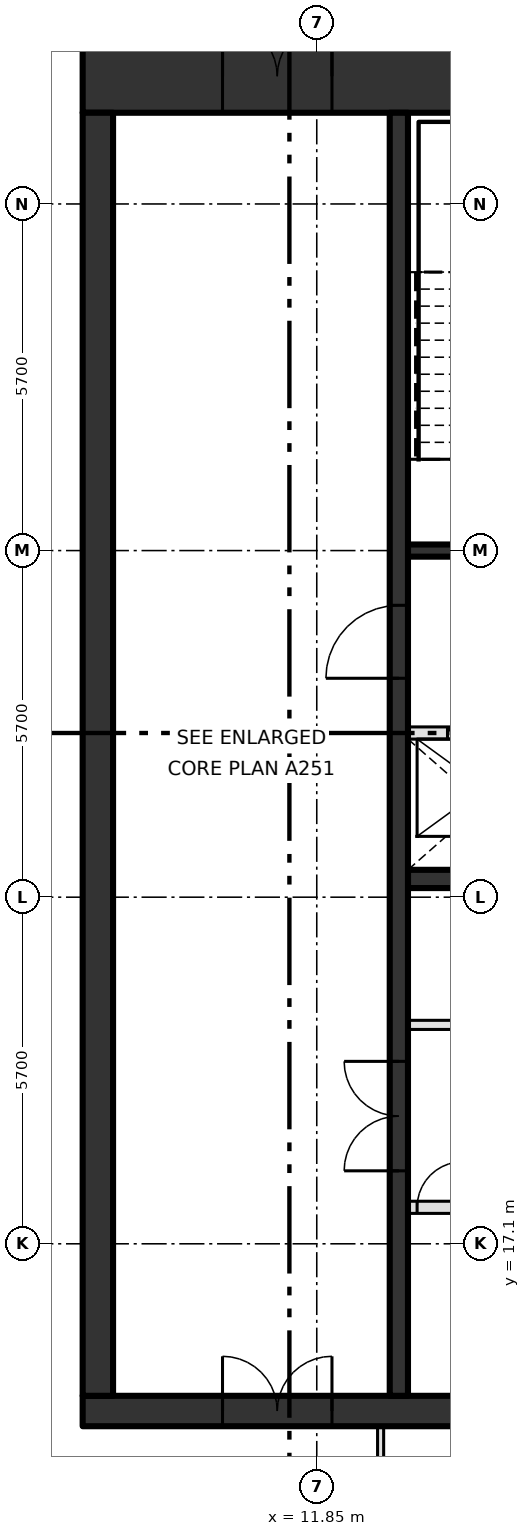
"""IFC4 building model, lengths in metres.
Left out: names, types, materials, properties, quantities, classifications, styles, units other than length and angle.
Written with IfcOpenShell. Run it as: python <this file> out.ifc"""

import sys

from ifc_helpers import new_model, si_unit, direction, frame, frame_2d, origin, place, context, subcontext, project, spatial, rectangle, extrude, element, fill, save


model = new_model("IFC4")
c1 = context("Model", 3, precision=1e-05, world=origin(), true_north=direction((0.0, 1.0)))
c2 = subcontext(c1, "Body", "Model", "MODEL_VIEW")
j1 = project(units=[si_unit("LENGTHUNIT", "METRE"), si_unit("PLANEANGLEUNIT", "RADIAN")], contexts=[c1])
p1 = place(None, origin())
s1 = spatial("IfcSite", under=j1, at=p1, CompositionType="ELEMENT")
p2 = place(p1, origin())
s2 = spatial("IfcBuilding", under=s1, at=p2, CompositionType="ELEMENT")
p3 = place(p2, frame((0.0, 0.0, 387.6)))
s3 = spatial("IfcBuildingStorey", under=s2, at=p3, CompositionType="ELEMENT", Elevation=387.6)
p4 = place(p3, frame((8.0, 14.35, -0.3), z_axis=(0.0, 0.0, 1.0), x_axis=(1.0, 0.0, 0.0)))
e1 = element("IfcWall", 1, at=p4, inside=s3, PredefinedType="SHEAR", context=c2, shape_type="SweptSolid", body=[
    extrude(rectangle(XDim=22.8, YDim=0.5, at=frame_2d((11.4, 0.0))), origin(), (0.0, 0.0, 1.0), 4.2),
])
p5 = place(p4, frame((2.3, 0.0, 0.3)))
e2 = element("IfcOpeningElement", 2, at=p5, cuts=e1, PredefinedType="OPENING", context=c2, shape_type="SweptSolid", body=[
    extrude(rectangle(XDim=1.8, YDim=2.1, at=frame_2d((0.9, 1.05))), frame((0.0, 0.26, 0.0), z_axis=(0.0, -1.0, 0.0), x_axis=(1.0, 0.0, 0.0)), (0.0, 0.0, 1.0), 0.52),
])
p6 = place(p3, frame((8.0, 36.3, -0.3), z_axis=(0.0, 0.0, 1.0), x_axis=(1.0, 0.0, 0.0)))
e3 = element("IfcWall", 3, at=p6, inside=s3, PredefinedType="SHEAR", context=c2, shape_type="SweptSolid", body=[
    extrude(rectangle(XDim=22.8, YDim=1.2, at=frame_2d((11.4, 0.0))), origin(), (0.0, 0.0, 1.0), 4.2),
])
p7 = place(p6, frame((2.3, 0.0, 0.3)))
e4 = element("IfcOpeningElement", 4, at=p7, cuts=e3, PredefinedType="OPENING", context=c2, shape_type="SweptSolid", body=[
    extrude(rectangle(XDim=1.8, YDim=2.1, at=frame_2d((0.9, 1.05))), frame((0.0, 0.61, 0.0), z_axis=(0.0, -1.0, 0.0), x_axis=(1.0, 0.0, 0.0)), (0.0, 0.0, 1.0), 1.22),
])
p8 = place(p3, frame((8.25, 14.6, -0.3), z_axis=(0.0, 0.0, 1.0), x_axis=(0.0, 1.0, 0.0)))
e5 = element("IfcWall", 5, at=p8, inside=s3, PredefinedType="SHEAR", context=c2, shape_type="SweptSolid", body=[
    extrude(rectangle(XDim=21.1, YDim=0.5, at=frame_2d((10.55, 0.0))), origin(), (0.0, 0.0, 1.0), 4.2),
])
p9 = place(p3, frame((13.35, 17.7, 0.0), z_axis=(0.0, 0.0, 1.0), x_axis=(1.0, 0.0, 0.0)))
e6 = element("IfcWall", 6, at=p9, inside=s3, PredefinedType="SOLIDWALL", context=c2, shape_type="SweptSolid", body=[
    extrude(rectangle(XDim=13.425, YDim=0.2, at=frame_2d((6.712, 0.0))), origin(), (0.0, 0.0, 1.0), 3.9),
])
p10 = place(p9, frame((2.0, 0.0, 0.0)))
e7 = element("IfcOpeningElement", 7, at=p10, cuts=e6, PredefinedType="OPENING", context=c2, shape_type="SweptSolid", body=[
    extrude(rectangle(XDim=1.1, YDim=2.1, at=frame_2d((0.55, 1.05))), frame((0.0, 0.11, 0.0), z_axis=(0.0, -1.0, 0.0), x_axis=(1.0, 0.0, 0.0)), (0.0, 0.0, 1.0), 0.22),
])
p11 = place(p9, frame((4.7, 0.0, 0.0)))
e8 = element("IfcOpeningElement", 8, at=p11, cuts=e6, PredefinedType="OPENING", context=c2, shape_type="SweptSolid", body=[
    extrude(rectangle(XDim=1.1, YDim=2.1, at=frame_2d((0.55, 1.05))), frame((0.0, 0.11, 0.0), z_axis=(0.0, -1.0, 0.0), x_axis=(1.0, 0.0, 0.0)), (0.0, 0.0, 1.0), 0.22),
])
p12 = place(p9, frame((7.4, 0.0, 0.0)))
e9 = element("IfcOpeningElement", 9, at=p12, cuts=e6, PredefinedType="OPENING", context=c2, shape_type="SweptSolid", body=[
    extrude(rectangle(XDim=1.1, YDim=2.1, at=frame_2d((0.55, 1.05))), frame((0.0, 0.11, 0.0), z_axis=(0.0, -1.0, 0.0), x_axis=(1.0, 0.0, 0.0)), (0.0, 0.0, 1.0), 0.22),
])
p13 = place(p9, frame((10.1, 0.0, 0.0)))
e10 = element("IfcOpeningElement", 10, at=p13, cuts=e6, PredefinedType="OPENING", context=c2, shape_type="SweptSolid", body=[
    extrude(rectangle(XDim=1.1, YDim=2.1, at=frame_2d((0.55, 1.05))), frame((0.0, 0.11, 0.0), z_axis=(0.0, -1.0, 0.0), x_axis=(1.0, 0.0, 0.0)), (0.0, 0.0, 1.0), 0.22),
])
p14 = place(p9, frame((0.15, 0.0, 0.0)))
e11 = element("IfcOpeningElement", 11, at=p14, cuts=e6, PredefinedType="OPENING", context=c2, shape_type="SweptSolid", body=[
    extrude(rectangle(XDim=0.75, YDim=2.1, at=frame_2d((0.375, 1.05))), frame((0.0, 0.11, 0.0), z_axis=(0.0, -1.0, 0.0), x_axis=(1.0, 0.0, 0.0)), (0.0, 0.0, 1.0), 0.22),
])
p15 = place(p9, frame((12.3, 0.0, 0.0)))
e12 = element("IfcOpeningElement", 12, at=p15, cuts=e6, PredefinedType="OPENING", context=c2, shape_type="SweptSolid", body=[
    extrude(rectangle(XDim=0.75, YDim=2.1, at=frame_2d((0.375, 1.05))), frame((0.0, 0.11, 0.0), z_axis=(0.0, -1.0, 0.0), x_axis=(1.0, 0.0, 0.0)), (0.0, 0.0, 1.0), 0.22),
])
p16 = place(p3, frame((13.35, 20.7, 0.0), z_axis=(0.0, 0.0, 1.0), x_axis=(1.0, 0.0, 0.0)))
e13 = element("IfcWall", 13, at=p16, inside=s3, PredefinedType="PARTITIONING", context=c2, shape_type="SweptSolid", body=[
    extrude(rectangle(XDim=13.425, YDim=0.15, at=frame_2d((6.712, 0.0))), origin(), (0.0, 0.0, 1.0), 3.9),
])
p17 = place(p16, frame((2.1, 0.0, 0.0)))
e14 = element("IfcOpeningElement", 14, at=p17, cuts=e13, PredefinedType="OPENING", context=c2, shape_type="SweptSolid", body=[
    extrude(rectangle(XDim=0.9, YDim=2.1, at=frame_2d((0.45, 1.05))), frame((0.0, 0.085, 0.0), z_axis=(0.0, -1.0, 0.0), x_axis=(1.0, 0.0, 0.0)), (0.0, 0.0, 1.0), 0.17),
])
p18 = place(p16, frame((8.85, 0.0, 0.0)))
e15 = element("IfcOpeningElement", 15, at=p18, cuts=e13, PredefinedType="OPENING", context=c2, shape_type="SweptSolid", body=[
    extrude(rectangle(XDim=0.9, YDim=2.1, at=frame_2d((0.45, 1.05))), frame((0.0, 0.085, 0.0), z_axis=(0.0, -1.0, 0.0), x_axis=(1.0, 0.0, 0.0)), (0.0, 0.0, 1.0), 0.17),
])
p19 = place(p3, frame((13.35, 23.1, 0.0), z_axis=(0.0, 0.0, 1.0), x_axis=(1.0, 0.0, 0.0)))
e16 = element("IfcWall", 16, at=p19, inside=s3, PredefinedType="SHEAR", context=c2, shape_type="SweptSolid", body=[
    extrude(rectangle(XDim=16.95, YDim=0.3, at=frame_2d((8.475, 0.0))), origin(), (0.0, 0.0, 1.0), 3.9),
])
p20 = place(p3, frame((13.35, 25.5, 0.0), z_axis=(0.0, 0.0, 1.0), x_axis=(1.0, 0.0, 0.0)))
e17 = element("IfcWall", 17, at=p20, inside=s3, PredefinedType="SOLIDWALL", context=c2, shape_type="SweptSolid", body=[
    extrude(rectangle(XDim=16.95, YDim=0.2, at=frame_2d((8.475, 0.0))), origin(), (0.0, 0.0, 1.0), 3.9),
])
p21 = place(p20, frame((0.65, 0.0, 0.0)))
e18 = element("IfcOpeningElement", 18, at=p21, cuts=e17, PredefinedType="OPENING", context=c2, shape_type="SweptSolid", body=[
    extrude(rectangle(XDim=1.1, YDim=2.1, at=frame_2d((0.55, 1.05))), frame((0.0, 0.11, 0.0), z_axis=(0.0, -1.0, 0.0), x_axis=(1.0, 0.0, 0.0)), (0.0, 0.0, 1.0), 0.22),
])
p22 = place(p20, frame((3.35, 0.0, 0.0)))
e19 = element("IfcOpeningElement", 19, at=p22, cuts=e17, PredefinedType="OPENING", context=c2, shape_type="SweptSolid", body=[
    extrude(rectangle(XDim=1.1, YDim=2.1, at=frame_2d((0.55, 1.05))), frame((0.0, 0.11, 0.0), z_axis=(0.0, -1.0, 0.0), x_axis=(1.0, 0.0, 0.0)), (0.0, 0.0, 1.0), 0.22),
])
p23 = place(p20, frame((6.05, 0.0, 0.0)))
e20 = element("IfcOpeningElement", 20, at=p23, cuts=e17, PredefinedType="OPENING", context=c2, shape_type="SweptSolid", body=[
    extrude(rectangle(XDim=1.1, YDim=2.1, at=frame_2d((0.55, 1.05))), frame((0.0, 0.11, 0.0), z_axis=(0.0, -1.0, 0.0), x_axis=(1.0, 0.0, 0.0)), (0.0, 0.0, 1.0), 0.22),
])
p24 = place(p20, frame((8.75, 0.0, 0.0)))
e21 = element("IfcOpeningElement", 21, at=p24, cuts=e17, PredefinedType="OPENING", context=c2, shape_type="SweptSolid", body=[
    extrude(rectangle(XDim=1.1, YDim=2.1, at=frame_2d((0.55, 1.05))), frame((0.0, 0.11, 0.0), z_axis=(0.0, -1.0, 0.0), x_axis=(1.0, 0.0, 0.0)), (0.0, 0.0, 1.0), 0.22),
])
p25 = place(p20, frame((13.0, 0.0, 0.0)))
e22 = element("IfcOpeningElement", 22, at=p25, cuts=e17, PredefinedType="OPENING", context=c2, shape_type="SweptSolid", body=[
    extrude(rectangle(XDim=0.9, YDim=2.1, at=frame_2d((0.45, 1.05))), frame((0.0, 0.11, 0.0), z_axis=(0.0, -1.0, 0.0), x_axis=(1.0, 0.0, 0.0)), (0.0, 0.0, 1.0), 0.22),
])
p26 = place(p3, frame((13.35, 28.5, 0.0), z_axis=(0.0, 0.0, 1.0), x_axis=(1.0, 0.0, 0.0)))
e23 = element("IfcWall", 23, at=p26, inside=s3, PredefinedType="SOLIDWALL", context=c2, shape_type="SweptSolid", body=[
    extrude(rectangle(XDim=6.75, YDim=0.2, at=frame_2d((3.375, 0.0))), origin(), (0.0, 0.0, 1.0), 3.9),
])
p27 = place(p26, frame((0.95, 0.0, 0.0)))
e24 = element("IfcOpeningElement", 24, at=p27, cuts=e23, PredefinedType="OPENING", context=c2, shape_type="SweptSolid", body=[
    extrude(rectangle(XDim=1.2, YDim=2.1, at=frame_2d((0.6, 1.05))), frame((0.0, 0.11, 0.0), z_axis=(0.0, -1.0, 0.0), x_axis=(1.0, 0.0, 0.0)), (0.0, 0.0, 1.0), 0.22),
])
p28 = place(p26, frame((3.75, 0.0, 0.0)))
e25 = element("IfcOpeningElement", 25, at=p28, cuts=e23, PredefinedType="OPENING", context=c2, shape_type="SweptSolid", body=[
    extrude(rectangle(XDim=1.1, YDim=2.1, at=frame_2d((0.55, 1.05))), frame((0.0, 0.11, 0.0), z_axis=(0.0, -1.0, 0.0), x_axis=(1.0, 0.0, 0.0)), (0.0, 0.0, 1.0), 0.22),
])
p29 = place(p3, frame((13.2, 14.6, 0.0), z_axis=(0.0, 0.0, 1.0), x_axis=(0.0, 1.0, 0.0)))
e26 = element("IfcWall", 26, at=p29, inside=s3, PredefinedType="SHEAR", context=c2, shape_type="SweptSolid", body=[
    extrude(rectangle(XDim=21.1, YDim=0.3, at=frame_2d((10.55, 0.0))), origin(), (0.0, 0.0, 1.0), 3.9),
])
p30 = place(p29, frame((3.7, 0.0, 0.0)))
e27 = element("IfcOpeningElement", 27, at=p30, cuts=e26, PredefinedType="OPENING", context=c2, shape_type="SweptSolid", body=[
    extrude(rectangle(XDim=1.8, YDim=2.1, at=frame_2d((0.9, 1.05))), frame((0.0, 0.16, 0.0), z_axis=(0.0, -1.0, 0.0), x_axis=(1.0, 0.0, 0.0)), (0.0, 0.0, 1.0), 0.32),
])
p31 = place(p29, frame((11.8, 0.0, 0.0)))
e28 = element("IfcOpeningElement", 28, at=p31, cuts=e26, PredefinedType="OPENING", context=c2, shape_type="SweptSolid", body=[
    extrude(rectangle(XDim=1.2, YDim=2.1, at=frame_2d((0.6, 1.05))), frame((0.0, 0.16, 0.0), z_axis=(0.0, -1.0, 0.0), x_axis=(1.0, 0.0, 0.0)), (0.0, 0.0, 1.0), 0.32),
])
p32 = place(p3, frame((12.9, 10.078, 0.0), z_axis=(0.0, 0.0, 1.0), x_axis=(0.0, 1.0, 0.0)))
e29 = element("IfcWall", 29, at=p32, inside=s3, PredefinedType="PARTITIONING", context=c2, shape_type="SweptSolid", body=[
    extrude(rectangle(XDim=4.022, YDim=0.1, at=frame_2d((2.011, 0.0))), origin(), (0.0, 0.0, 1.0), 3.9),
])
p33 = place(p32, frame((1.58, 0.0, 0.0)))
e30 = element("IfcOpeningElement", 30, at=p33, cuts=e29, PredefinedType="OPENING", context=c2, shape_type="SweptSolid", body=[
    extrude(rectangle(XDim=1.0, YDim=2.1, at=frame_2d((0.5, 1.05))), frame((0.0, 0.06, 0.0), z_axis=(0.0, -1.0, 0.0), x_axis=(1.0, 0.0, 0.0)), (0.0, 0.0, 1.0), 0.12),
])
p34 = place(p21, origin())
e31 = element("IfcDoor", 31, at=p34, inside=s3, OperationType="SLIDING_TO_LEFT", PredefinedType="DOOR", context=c2, shape_type="SweptSolid", body=[
    extrude(rectangle(XDim=1.1, YDim=2.1, at=frame_2d((0.55, 1.05))), frame((0.0, 0.025, 0.0), z_axis=(0.0, -1.0, 0.0), x_axis=(1.0, 0.0, 0.0)), (0.0, 0.0, 1.0), 0.05),
])
fill(e18, e31)
p35 = place(p14, origin())
e32 = element("IfcDoor", 32, at=p35, inside=s3, OperationType="SINGLE_SWING_RIGHT", PredefinedType="DOOR", context=c2, shape_type="SweptSolid", body=[
    extrude(rectangle(XDim=0.75, YDim=2.1, at=frame_2d((0.375, 1.05))), frame((0.0, 0.025, 0.0), z_axis=(0.0, -1.0, 0.0), x_axis=(1.0, 0.0, 0.0)), (0.0, 0.0, 1.0), 0.05),
])
fill(e11, e32)
p36 = place(p30, origin())
e33 = element("IfcDoor", 33, at=p36, inside=s3, OperationType="DOUBLE_DOOR_SINGLE_SWING", PredefinedType="DOOR", context=c2, shape_type="SweptSolid", body=[
    extrude(rectangle(XDim=1.8, YDim=2.1, at=frame_2d((0.9, 1.05))), frame((0.0, 0.025, 0.0), z_axis=(0.0, -1.0, 0.0), x_axis=(1.0, 0.0, 0.0)), (0.0, 0.0, 1.0), 0.05),
])
fill(e27, e33)
p37 = place(p31, origin())
e34 = element("IfcDoor", 34, at=p37, inside=s3, OperationType="SINGLE_SWING_LEFT", PredefinedType="DOOR", context=c2, shape_type="SweptSolid", body=[
    extrude(rectangle(XDim=1.2, YDim=2.1, at=frame_2d((0.6, 1.05))), frame((0.0, 0.025, 0.0), z_axis=(0.0, -1.0, 0.0), x_axis=(1.0, 0.0, 0.0)), (0.0, 0.0, 1.0), 0.05),
])
fill(e28, e34)
p38 = place(p7, origin())
e35 = element("IfcDoor", 35, at=p38, inside=s3, OperationType="DOUBLE_DOOR_SINGLE_SWING", PredefinedType="DOOR", context=c2, shape_type="SweptSolid", body=[
    extrude(rectangle(XDim=1.8, YDim=2.1, at=frame_2d((0.9, 1.05))), frame((0.0, 0.025, 0.0), z_axis=(0.0, -1.0, 0.0), x_axis=(1.0, 0.0, 0.0)), (0.0, 0.0, 1.0), 0.05),
])
fill(e4, e35)
p39 = place(p5, origin())
e36 = element("IfcDoor", 36, at=p39, inside=s3, OperationType="DOUBLE_DOOR_SINGLE_SWING", PredefinedType="DOOR", context=c2, shape_type="SweptSolid", body=[
    extrude(rectangle(XDim=1.8, YDim=2.1, at=frame_2d((0.9, 1.05))), frame((0.0, 0.025, 0.0), z_axis=(0.0, -1.0, 0.0), x_axis=(1.0, 0.0, 0.0)), (0.0, 0.0, 1.0), 0.05),
])
fill(e2, e36)
save(model, sys.argv[1])
